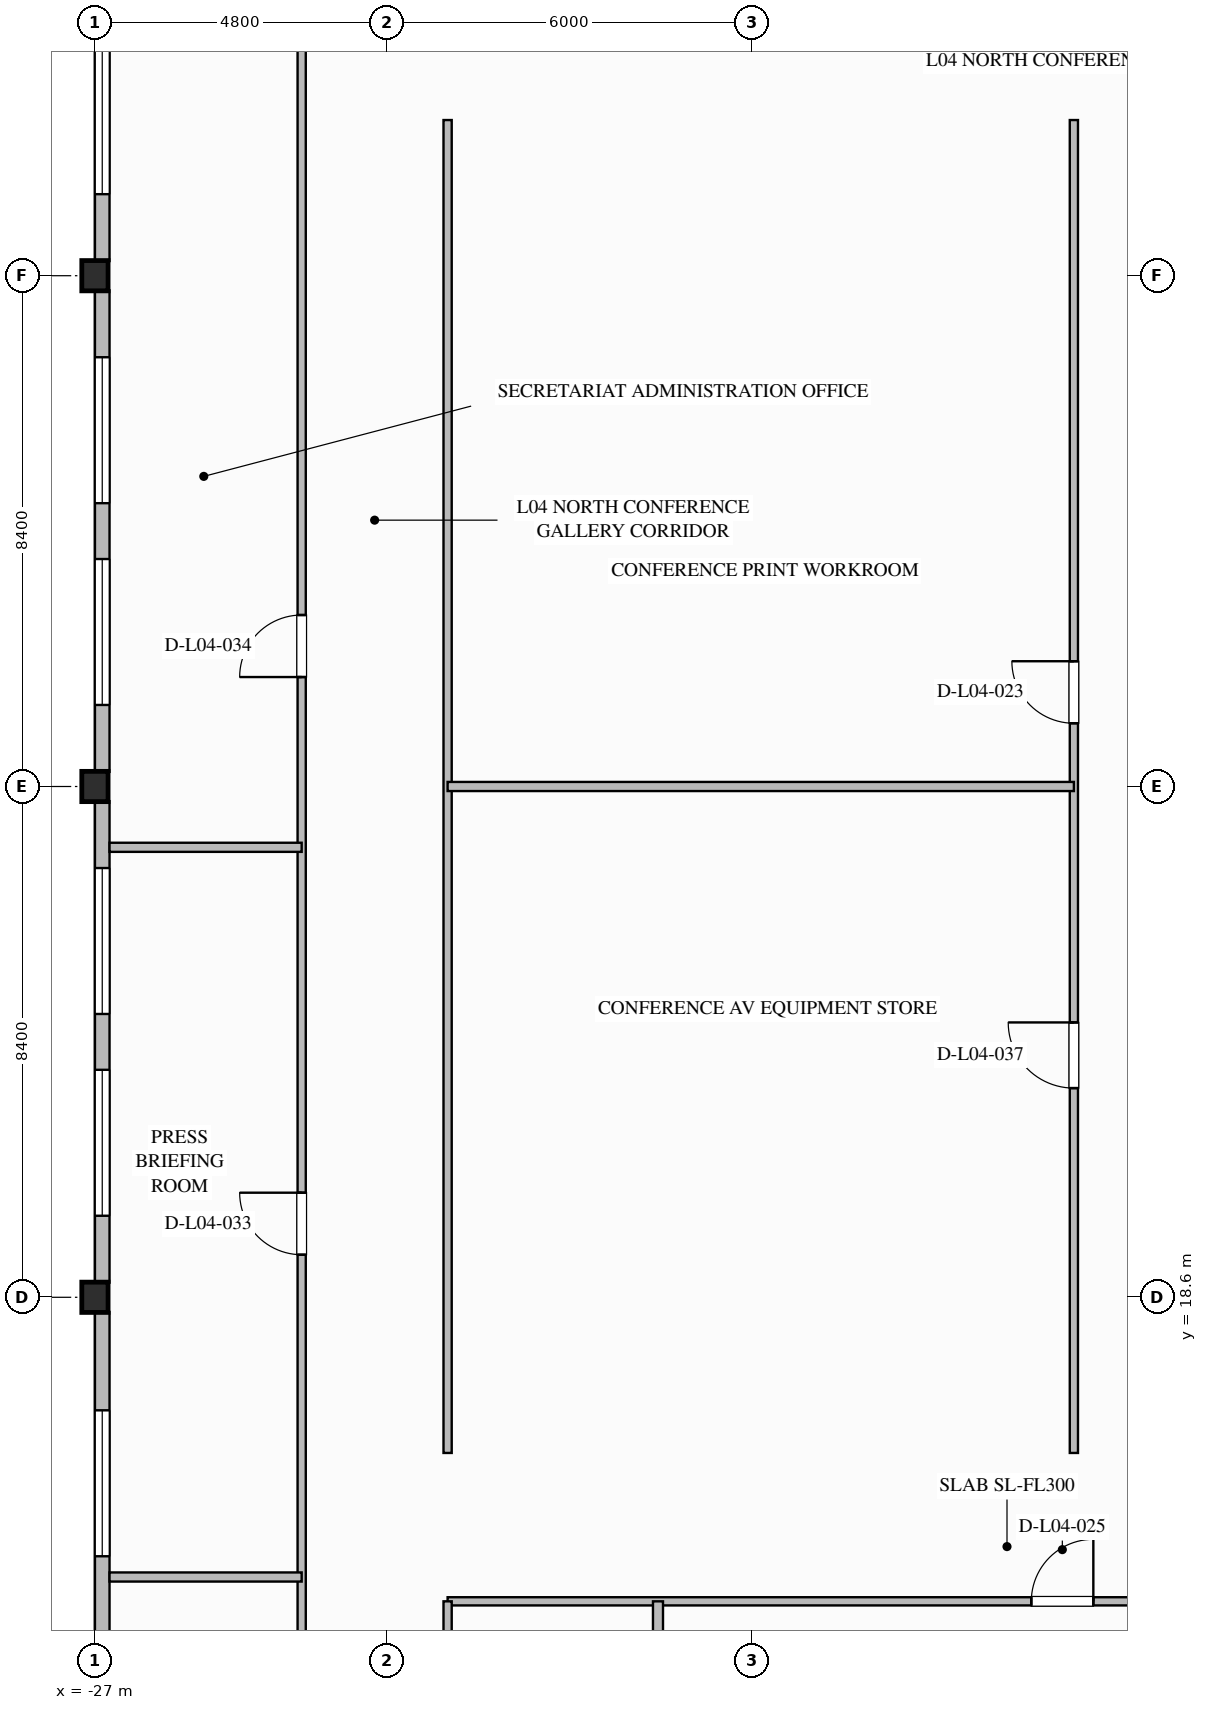
"""IFC4 building model, lengths in metres.
Left out: names, types, materials, properties, quantities, classifications, styles, units other than length and angle.
Written with IfcOpenShell. Run it as: python <this file> out.ifc"""

import sys

from ifc_helpers import new_model, si_unit, direction, frame, frame_2d, origin, origin_2d, place, context, subcontext, project, spatial, rectangle, i_section, extrude, element, fill, save


model = new_model("IFC4")
c1 = context("Model", 3, precision=1e-05, world=origin(), true_north=direction((0.0, 1.0)))
c2 = subcontext(c1, "Body", "Model", "MODEL_VIEW")
j1 = project(units=[si_unit("LENGTHUNIT", "METRE"), si_unit("PLANEANGLEUNIT", "RADIAN")], contexts=[c1])
p1 = place(None, origin())
s1 = spatial("IfcSite", under=j1, at=p1, CompositionType="ELEMENT")
p2 = place(p1, origin())
s2 = spatial("IfcBuilding", under=s1, at=p2, CompositionType="ELEMENT")
p3 = place(p2, frame((0.0, 0.0, 22.4)))
s3 = spatial("IfcBuildingStorey", under=s2, at=p3, CompositionType="ELEMENT", Elevation=22.4)
for number, where, z_axis, x_axis in (
    (1, (-27.0, 18.6, 0.0), (0.0, 0.0, 1.0), (1.0, 0.0, 0.0)),
    (2, (-27.0, 27.0, 0.0), (0.0, 0.0, 1.0), (1.0, 0.0, 0.0)),
    (3, (-27.0, 35.4, 0.0), (0.0, 0.0, 1.0), (1.0, 0.0, 0.0)),
):
    element("IfcColumn", number, at=place(p3, frame(where, z_axis=z_axis, x_axis=x_axis)), inside=s3, PredefinedType="COLUMN", context=c2, shape_type="SweptSolid", body=[
        extrude(i_section(OverallWidth=0.432, OverallDepth=0.498, WebThickness=0.056, FlangeThickness=0.089, FilletRadius=0.03, at=origin_2d()), origin(), (0.0, 0.0, 1.0), 5.2),
    ])
p4 = place(p3, frame((-26.88, 11.041, 0.0), z_axis=(0.0, 0.0, 1.0), x_axis=(0.0, 1.0, 0.0)))
e4 = element("IfcWall", 4, at=p4, inside=s3, PredefinedType="STANDARD", context=c2, shape_type="SweptSolid", body=[
    extrude(rectangle(XDim=7.318, YDim=0.24, at=frame_2d((3.659, 0.0))), origin(), (0.0, 0.0, 1.0), 4.155),
])
p5 = place(p4, frame((3.3, 0.0, 0.7)))
e5 = element("IfcOpeningElement", 5, at=p5, cuts=e4, PredefinedType="OPENING", context=c2, shape_type="SweptSolid", body=[
    extrude(rectangle(XDim=2.4, YDim=2.4, at=frame_2d((1.2, 1.2))), frame((0.0, 0.13, 0.0), z_axis=(0.0, -1.0, 0.0), x_axis=(1.0, 0.0, 0.0)), (0.0, 0.0, 1.0), 0.26),
])
p6 = place(p3, frame((-26.88, 18.841, 0.0), z_axis=(0.0, 0.0, 1.0), x_axis=(0.0, 1.0, 0.0)))
e6 = element("IfcWall", 6, at=p6, inside=s3, PredefinedType="STANDARD", context=c2, shape_type="SweptSolid", body=[
    extrude(rectangle(XDim=7.918, YDim=0.24, at=frame_2d((3.959, 0.0))), origin(), (0.0, 0.0, 1.0), 4.155),
])
p7 = place(p6, frame((1.1, 0.0, 0.7)))
e7 = element("IfcOpeningElement", 7, at=p7, cuts=e6, PredefinedType="OPENING", context=c2, shape_type="SweptSolid", body=[
    extrude(rectangle(XDim=2.4, YDim=2.4, at=frame_2d((1.2, 1.2))), frame((0.0, 0.13, 0.0), z_axis=(0.0, -1.0, 0.0), x_axis=(1.0, 0.0, 0.0)), (0.0, 0.0, 1.0), 0.26),
])
p8 = place(p6, frame((4.418, 0.0, 0.7)))
e8 = element("IfcOpeningElement", 8, at=p8, cuts=e6, PredefinedType="OPENING", context=c2, shape_type="SweptSolid", body=[
    extrude(rectangle(XDim=2.4, YDim=2.4, at=frame_2d((1.2, 1.2))), frame((0.0, 0.13, 0.0), z_axis=(0.0, -1.0, 0.0), x_axis=(1.0, 0.0, 0.0)), (0.0, 0.0, 1.0), 0.26),
])
p9 = place(p3, frame((-26.88, 27.241, 0.0), z_axis=(0.0, 0.0, 1.0), x_axis=(0.0, 1.0, 0.0)))
e9 = element("IfcWall", 9, at=p9, inside=s3, PredefinedType="STANDARD", context=c2, shape_type="SweptSolid", body=[
    extrude(rectangle(XDim=7.918, YDim=0.24, at=frame_2d((3.959, 0.0))), origin(), (0.0, 0.0, 1.0), 4.155),
])
p10 = place(p9, frame((1.1, 0.0, 0.7)))
e10 = element("IfcOpeningElement", 10, at=p10, cuts=e9, PredefinedType="OPENING", context=c2, shape_type="SweptSolid", body=[
    extrude(rectangle(XDim=2.4, YDim=2.4, at=frame_2d((1.2, 1.2))), frame((0.0, 0.13, 0.0), z_axis=(0.0, -1.0, 0.0), x_axis=(1.0, 0.0, 0.0)), (0.0, 0.0, 1.0), 0.26),
])
p11 = place(p9, frame((4.418, 0.0, 0.7)))
e11 = element("IfcOpeningElement", 11, at=p11, cuts=e9, PredefinedType="OPENING", context=c2, shape_type="SweptSolid", body=[
    extrude(rectangle(XDim=2.4, YDim=2.4, at=frame_2d((1.2, 1.2))), frame((0.0, 0.13, 0.0), z_axis=(0.0, -1.0, 0.0), x_axis=(1.0, 0.0, 0.0)), (0.0, 0.0, 1.0), 0.26),
])
p12 = place(p3, frame((-26.88, 35.641, 0.0), z_axis=(0.0, 0.0, 1.0), x_axis=(0.0, 1.0, 0.0)))
e12 = element("IfcWall", 12, at=p12, inside=s3, PredefinedType="STANDARD", context=c2, shape_type="SweptSolid", body=[
    extrude(rectangle(XDim=7.318, YDim=0.24, at=frame_2d((3.659, 0.0))), origin(), (0.0, 0.0, 1.0), 4.155),
])
p13 = place(p12, frame((1.1, 0.0, 0.7)))
e13 = element("IfcOpeningElement", 13, at=p13, cuts=e12, PredefinedType="OPENING", context=c2, shape_type="SweptSolid", body=[
    extrude(rectangle(XDim=2.4, YDim=2.4, at=frame_2d((1.2, 1.2))), frame((0.0, 0.13, 0.0), z_axis=(0.0, -1.0, 0.0), x_axis=(1.0, 0.0, 0.0)), (0.0, 0.0, 1.0), 0.26),
])
p14 = place(p12, frame((3.818, 0.0, 0.7)))
e14 = element("IfcOpeningElement", 14, at=p14, cuts=e12, PredefinedType="OPENING", context=c2, shape_type="SweptSolid", body=[
    extrude(rectangle(XDim=2.4, YDim=2.4, at=frame_2d((1.2, 1.2))), frame((0.0, 0.13, 0.0), z_axis=(0.0, -1.0, 0.0), x_axis=(1.0, 0.0, 0.0)), (0.0, 0.0, 1.0), 0.26),
])
p15 = place(p3, frame((-21.2, 13.6, 0.0), z_axis=(0.0, 0.0, 1.0), x_axis=(1.0, 0.0, 0.0)))
e15 = element("IfcWall", 15, at=p15, inside=s3, PredefinedType="PARTITIONING", context=c2, shape_type="SweptSolid", body=[
    extrude(rectangle(XDim=46.3, YDim=0.135, at=frame_2d((23.15, 0.0))), origin(), (0.0, 0.0, 1.0), 4.85),
])
p16 = place(p15, frame((9.6, 0.0, 0.0)))
e16 = element("IfcOpeningElement", 16, at=p16, cuts=e15, PredefinedType="OPENING", context=c2, shape_type="SweptSolid", body=[
    extrude(rectangle(XDim=1.02, YDim=2.15, at=frame_2d((0.51, 1.075))), frame((0.0, 0.077, 0.0), z_axis=(0.0, -1.0, 0.0), x_axis=(1.0, 0.0, 0.0)), (0.0, 0.0, 1.0), 0.155),
])
p17 = place(p15, frame((19.1, 0.0, 0.0)))
e17 = element("IfcOpeningElement", 17, at=p17, cuts=e15, PredefinedType="OPENING", context=c2, shape_type="SweptSolid", body=[
    extrude(rectangle(XDim=1.02, YDim=2.15, at=frame_2d((0.51, 1.075))), frame((0.0, 0.077, 0.0), z_axis=(0.0, -1.0, 0.0), x_axis=(1.0, 0.0, 0.0)), (0.0, 0.0, 1.0), 0.155),
])
p18 = place(p15, frame((26.3, 0.0, 0.0)))
e18 = element("IfcOpeningElement", 18, at=p18, cuts=e15, PredefinedType="OPENING", context=c2, shape_type="SweptSolid", body=[
    extrude(rectangle(XDim=1.02, YDim=2.15, at=frame_2d((0.51, 1.075))), frame((0.0, 0.077, 0.0), z_axis=(0.0, -1.0, 0.0), x_axis=(1.0, 0.0, 0.0)), (0.0, 0.0, 1.0), 0.155),
])
p19 = place(p15, frame((34.0, 0.0, 0.0)))
e19 = element("IfcOpeningElement", 19, at=p19, cuts=e15, PredefinedType="OPENING", context=c2, shape_type="SweptSolid", body=[
    extrude(rectangle(XDim=1.02, YDim=2.15, at=frame_2d((0.51, 1.075))), frame((0.0, 0.077, 0.0), z_axis=(0.0, -1.0, 0.0), x_axis=(1.0, 0.0, 0.0)), (0.0, 0.0, 1.0), 0.155),
])
p20 = place(p15, frame((41.4, 0.0, 0.0)))
e20 = element("IfcOpeningElement", 20, at=p20, cuts=e15, PredefinedType="OPENING", context=c2, shape_type="SweptSolid", body=[
    extrude(rectangle(XDim=1.02, YDim=2.15, at=frame_2d((0.51, 1.075))), frame((0.0, 0.077, 0.0), z_axis=(0.0, -1.0, 0.0), x_axis=(1.0, 0.0, 0.0)), (0.0, 0.0, 1.0), 0.155),
])
p21 = place(p3, frame((-10.9, 16.04, 0.0), z_axis=(0.0, 0.0, 1.0), x_axis=(0.0, 1.0, 0.0)))
e21 = element("IfcWall", 21, at=p21, inside=s3, PredefinedType="PARTITIONING", context=c2, shape_type="SweptSolid", body=[
    extrude(rectangle(XDim=21.92, YDim=0.135, at=frame_2d((10.96, 0.0))), origin(), (0.0, 0.0, 1.0), 4.85),
])
p22 = place(p21, frame((12.0, 0.0, 0.0)))
e22 = element("IfcOpeningElement", 22, at=p22, cuts=e21, PredefinedType="OPENING", context=c2, shape_type="SweptSolid", body=[
    extrude(rectangle(XDim=1.02, YDim=2.15, at=frame_2d((0.51, 1.075))), frame((0.0, 0.077, 0.0), z_axis=(0.0, -1.0, 0.0), x_axis=(1.0, 0.0, 0.0)), (0.0, 0.0, 1.0), 0.155),
])
p23 = place(p21, frame((6.0, 0.0, 0.0)))
e23 = element("IfcOpeningElement", 23, at=p23, cuts=e21, PredefinedType="OPENING", context=c2, shape_type="SweptSolid", body=[
    extrude(rectangle(XDim=1.08, YDim=2.04, at=frame_2d((0.54, 1.02))), frame((0.0, 0.077, 0.0), z_axis=(0.0, -1.0, 0.0), x_axis=(1.0, 0.0, 0.0)), (0.0, 0.0, 1.0), 0.155),
])
p24 = place(p3, frame((-17.74, 10.3, 0.0), z_axis=(0.0, 0.0, 1.0), x_axis=(0.0, 1.0, 0.0)))
e24 = element("IfcWall", 24, at=p24, inside=s3, PredefinedType="PARTITIONING", context=c2, shape_type="SweptSolid", body=[
    extrude(rectangle(XDim=3.3, YDim=0.165, at=frame_2d((1.65, 0.0))), origin(), (0.0, 0.0, 1.0), 4.85),
])
p25 = place(p3, frame((-21.2, 10.3, 0.0), z_axis=(0.0, 0.0, 1.0), x_axis=(0.0, 1.0, 0.0)))
e25 = element("IfcWall", 25, at=p25, inside=s3, PredefinedType="PARTITIONING", context=c2, shape_type="SweptSolid", body=[
    extrude(rectangle(XDim=3.3, YDim=0.135, at=frame_2d((1.65, 0.0))), origin(), (0.0, 0.0, 1.0), 4.85),
])
p26 = place(p3, frame((-21.2, 16.04, 0.0), z_axis=(0.0, 0.0, 1.0), x_axis=(0.0, 1.0, 0.0)))
e26 = element("IfcWall", 26, at=p26, inside=s3, PredefinedType="PARTITIONING", context=c2, shape_type="SweptSolid", body=[
    extrude(rectangle(XDim=21.92, YDim=0.135, at=frame_2d((10.96, 0.0))), origin(), (0.0, 0.0, 1.0), 4.85),
])
p27 = place(p3, frame((-23.6, 0.3, 0.0), z_axis=(0.0, 0.0, 1.0), x_axis=(0.0, 1.0, 0.0)))
e27 = element("IfcWall", 27, at=p27, inside=s3, PredefinedType="PARTITIONING", context=c2, shape_type="SweptSolid", body=[
    extrude(rectangle(XDim=40.1, YDim=0.135, at=frame_2d((20.05, 0.0))), origin(), (0.0, 0.0, 1.0), 4.85),
])
p28 = place(p27, frame((19.0, 0.0, 0.0)))
e28 = element("IfcOpeningElement", 28, at=p28, cuts=e27, PredefinedType="OPENING", context=c2, shape_type="SweptSolid", body=[
    extrude(rectangle(XDim=1.02, YDim=2.15, at=frame_2d((0.51, 1.075))), frame((0.0, 0.077, 0.0), z_axis=(0.0, -1.0, 0.0), x_axis=(1.0, 0.0, 0.0)), (0.0, 0.0, 1.0), 0.155),
])
p29 = place(p27, frame((28.5, 0.0, 0.0)))
e29 = element("IfcOpeningElement", 29, at=p29, cuts=e27, PredefinedType="OPENING", context=c2, shape_type="SweptSolid", body=[
    extrude(rectangle(XDim=1.02, YDim=2.15, at=frame_2d((0.51, 1.075))), frame((0.0, 0.077, 0.0), z_axis=(0.0, -1.0, 0.0), x_axis=(1.0, 0.0, 0.0)), (0.0, 0.0, 1.0), 0.155),
])
p30 = place(p27, frame((9.0, 0.0, 0.0)))
e30 = element("IfcOpeningElement", 30, at=p30, cuts=e27, PredefinedType="OPENING", context=c2, shape_type="SweptSolid", body=[
    extrude(rectangle(XDim=1.08, YDim=2.04, at=frame_2d((0.54, 1.02))), frame((0.0, 0.077, 0.0), z_axis=(0.0, -1.0, 0.0), x_axis=(1.0, 0.0, 0.0)), (0.0, 0.0, 1.0), 0.155),
])
for number, where, z_axis, x_axis in (
    (31, (-26.76, 14.0, 0.0), (0.0, 0.0, 1.0), (1.0, 0.0, 0.0)),
    (32, (-26.76, 26.0, 0.0), (0.0, 0.0, 1.0), (1.0, 0.0, 0.0)),
):
    element("IfcWall", number, at=place(p3, frame(where, z_axis=z_axis, x_axis=x_axis)), inside=s3, PredefinedType="PARTITIONING", context=c2, shape_type="SweptSolid", body=[
        extrude(rectangle(XDim=3.16, YDim=0.15, at=frame_2d((1.58, 0.0))), origin(), (0.0, 0.0, 1.0), 4.85),
    ])
p31 = place(p3, frame((-21.2, 27.0, 0.0), z_axis=(0.0, 0.0, 1.0), x_axis=(1.0, 0.0, 0.0)))
e33 = element("IfcWall", 33, at=p31, inside=s3, PredefinedType="PARTITIONING", context=c2, shape_type="SweptSolid", body=[
    extrude(rectangle(XDim=10.3, YDim=0.15, at=frame_2d((5.15, 0.0))), origin(), (0.0, 0.0, 1.0), 4.062),
])
p32 = place(p5, origin())
e34 = element("IfcWindow", 34, at=p32, inside=s3, PartitioningType="SINGLE_PANEL", PredefinedType="WINDOW", context=c2, shape_type="SweptSolid", body=[
    extrude(rectangle(XDim=2.4, YDim=2.4, at=frame_2d((1.2, 1.2))), frame((0.0, 0.03, 0.0), z_axis=(0.0, -1.0, 0.0), x_axis=(1.0, 0.0, 0.0)), (0.0, 0.0, 1.0), 0.06),
])
fill(e5, e34)
p33 = place(p7, origin())
e35 = element("IfcWindow", 35, at=p33, inside=s3, PartitioningType="SINGLE_PANEL", PredefinedType="WINDOW", context=c2, shape_type="SweptSolid", body=[
    extrude(rectangle(XDim=2.4, YDim=2.4, at=frame_2d((1.2, 1.2))), frame((0.0, 0.03, 0.0), z_axis=(0.0, -1.0, 0.0), x_axis=(1.0, 0.0, 0.0)), (0.0, 0.0, 1.0), 0.06),
])
fill(e7, e35)
p34 = place(p8, origin())
e36 = element("IfcWindow", 36, at=p34, inside=s3, PartitioningType="SINGLE_PANEL", PredefinedType="WINDOW", context=c2, shape_type="SweptSolid", body=[
    extrude(rectangle(XDim=2.4, YDim=2.4, at=frame_2d((1.2, 1.2))), frame((0.0, 0.03, 0.0), z_axis=(0.0, -1.0, 0.0), x_axis=(1.0, 0.0, 0.0)), (0.0, 0.0, 1.0), 0.06),
])
fill(e8, e36)
p35 = place(p10, origin())
e37 = element("IfcWindow", 37, at=p35, inside=s3, PartitioningType="SINGLE_PANEL", PredefinedType="WINDOW", context=c2, shape_type="SweptSolid", body=[
    extrude(rectangle(XDim=2.4, YDim=2.4, at=frame_2d((1.2, 1.2))), frame((0.0, 0.03, 0.0), z_axis=(0.0, -1.0, 0.0), x_axis=(1.0, 0.0, 0.0)), (0.0, 0.0, 1.0), 0.06),
])
fill(e10, e37)
p36 = place(p11, origin())
e38 = element("IfcWindow", 38, at=p36, inside=s3, PartitioningType="SINGLE_PANEL", PredefinedType="WINDOW", context=c2, shape_type="SweptSolid", body=[
    extrude(rectangle(XDim=2.4, YDim=2.4, at=frame_2d((1.2, 1.2))), frame((0.0, 0.03, 0.0), z_axis=(0.0, -1.0, 0.0), x_axis=(1.0, 0.0, 0.0)), (0.0, 0.0, 1.0), 0.06),
])
fill(e11, e38)
p37 = place(p13, origin())
e39 = element("IfcWindow", 39, at=p37, inside=s3, PartitioningType="SINGLE_PANEL", PredefinedType="WINDOW", context=c2, shape_type="SweptSolid", body=[
    extrude(rectangle(XDim=2.4, YDim=2.4, at=frame_2d((1.2, 1.2))), frame((0.0, 0.03, 0.0), z_axis=(0.0, -1.0, 0.0), x_axis=(1.0, 0.0, 0.0)), (0.0, 0.0, 1.0), 0.06),
])
fill(e13, e39)
p38 = place(p22, origin())
e40 = element("IfcDoor", 40, at=p38, inside=s3, OperationType="SINGLE_SWING_RIGHT", PredefinedType="DOOR", context=c2, shape_type="SweptSolid", body=[
    extrude(rectangle(XDim=1.02, YDim=2.15, at=frame_2d((0.51, 1.075))), frame((0.0, 0.025, 0.0), z_axis=(0.0, -1.0, 0.0), x_axis=(1.0, 0.0, 0.0)), (0.0, 0.0, 1.0), 0.05),
])
fill(e22, e40)
p39 = place(p16, origin())
e41 = element("IfcDoor", 41, at=p39, inside=s3, OperationType="SINGLE_SWING_RIGHT", PredefinedType="DOOR", context=c2, shape_type="SweptSolid", body=[
    extrude(rectangle(XDim=1.02, YDim=2.15, at=frame_2d((0.51, 1.075))), frame((0.0, 0.025, 0.0), z_axis=(0.0, -1.0, 0.0), x_axis=(1.0, 0.0, 0.0)), (0.0, 0.0, 1.0), 0.05),
])
fill(e16, e41)
p40 = place(p28, origin())
e42 = element("IfcDoor", 42, at=p40, inside=s3, OperationType="SINGLE_SWING_RIGHT", PredefinedType="DOOR", context=c2, shape_type="SweptSolid", body=[
    extrude(rectangle(XDim=1.02, YDim=2.15, at=frame_2d((0.51, 1.075))), frame((0.0, 0.025, 0.0), z_axis=(0.0, -1.0, 0.0), x_axis=(1.0, 0.0, 0.0)), (0.0, 0.0, 1.0), 0.05),
])
fill(e28, e42)
p41 = place(p29, origin())
e43 = element("IfcDoor", 43, at=p41, inside=s3, OperationType="SINGLE_SWING_LEFT", PredefinedType="DOOR", context=c2, shape_type="SweptSolid", body=[
    extrude(rectangle(XDim=1.02, YDim=2.15, at=frame_2d((0.51, 1.075))), frame((0.0, 0.025, 0.0), z_axis=(0.0, -1.0, 0.0), x_axis=(1.0, 0.0, 0.0)), (0.0, 0.0, 1.0), 0.05),
])
fill(e29, e43)
p42 = place(p23, origin())
e44 = element("IfcDoor", 44, at=p42, inside=s3, OperationType="SINGLE_SWING_RIGHT", PredefinedType="DOOR", context=c2, shape_type="SweptSolid", body=[
    extrude(rectangle(XDim=1.08, YDim=2.04, at=frame_2d((0.54, 1.02))), frame((0.0, 0.025, 0.0), z_axis=(0.0, -1.0, 0.0), x_axis=(1.0, 0.0, 0.0)), (0.0, 0.0, 1.0), 0.05),
])
fill(e23, e44)
save(model, sys.argv[1])
